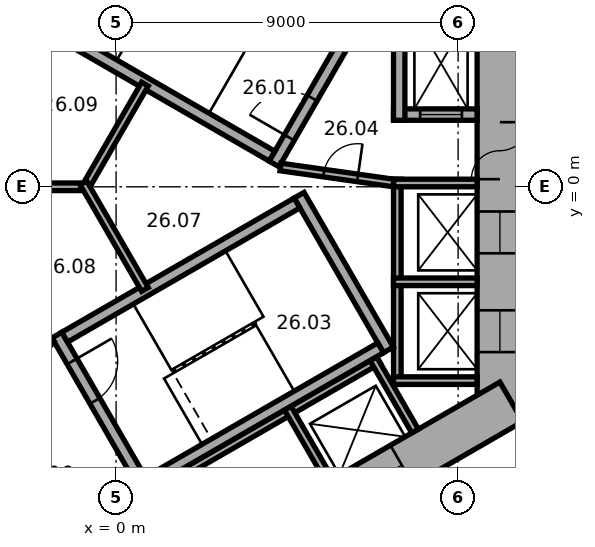
"""IFC4 building model, lengths in metres.
Left out: names, types, materials, properties, quantities, classifications, styles, units other than length and angle.
Written with IfcOpenShell. Run it as: python <this file> out.ifc"""

import sys

from ifc_helpers import new_model, si_unit, direction, frame, frame_2d, origin, place, context, subcontext, project, spatial, rectangle, extrude, element, fill, save


model = new_model("IFC4")
c1 = context("Model", 3, precision=1e-05, world=origin(), true_north=direction((0.0, 1.0)))
c2 = subcontext(c1, "Body", "Model", "MODEL_VIEW")
j1 = project(units=[si_unit("LENGTHUNIT", "METRE"), si_unit("PLANEANGLEUNIT", "RADIAN")], contexts=[c1])
p1 = place(None, origin())
s1 = spatial("IfcSite", under=j1, at=p1, CompositionType="ELEMENT")
p2 = place(p1, origin())
s2 = spatial("IfcBuilding", under=s1, at=p2, CompositionType="ELEMENT")
p3 = place(p2, frame((0.0, 0.0, 110.0)))
s3 = spatial("IfcBuildingStorey", under=s2, at=p3, CompositionType="ELEMENT", Elevation=110.0)
p4 = place(p3, frame((10.1, -6.177, 0.0), z_axis=(0.0, 0.0, 1.0), x_axis=(0.0, 1.0, 0.0)))
e1 = element("IfcWall", 1, at=p4, inside=s3, PredefinedType="SHEAR", context=c2, shape_type="SweptSolid", body=[
    extrude(rectangle(XDim=12.355, YDim=1.2, at=frame_2d((6.177, 0.0))), origin(), (0.0, 0.0, 1.0), 3.3),
])
p5 = place(p4, frame((6.378, 0.0, 0.0)))
e2 = element("IfcOpeningElement", 2, at=p5, cuts=e1, PredefinedType="OPENING", context=c2, shape_type="SweptSolid", body=[
    extrude(rectangle(XDim=1.5, YDim=2.1, at=frame_2d((0.75, 1.05))), frame((0.0, 0.61, 0.0), z_axis=(0.0, -1.0, 0.0), x_axis=(1.0, 0.0, 0.0)), (0.0, 0.0, 1.0), 1.22),
])
p6 = place(p4, frame((1.828, 0.0, 0.0)))
e3 = element("IfcOpeningElement", 3, at=p6, cuts=e1, PredefinedType="OPENING", context=c2, shape_type="SweptSolid", body=[
    extrude(rectangle(XDim=1.1, YDim=2.1, at=frame_2d((0.55, 1.05))), frame((0.0, 0.61, 0.0), z_axis=(0.0, -1.0, 0.0), x_axis=(1.0, 0.0, 0.0)), (0.0, 0.0, 1.0), 1.22),
])
p7 = place(p4, frame((4.427, 0.0, 0.0)))
e4 = element("IfcOpeningElement", 4, at=p7, cuts=e1, PredefinedType="OPENING", context=c2, shape_type="SweptSolid", body=[
    extrude(rectangle(XDim=1.1, YDim=2.1, at=frame_2d((0.55, 1.05))), frame((0.0, 0.61, 0.0), z_axis=(0.0, -1.0, 0.0), x_axis=(1.0, 0.0, 0.0)), (0.0, 0.0, 1.0), 1.22),
])
p8 = place(p3, frame((-10.4, -5.658, 0.0), z_axis=(0.0, 0.0, 1.0), x_axis=(0.866021384402, -0.500006961711, 0.0)))
e5 = element("IfcWall", 5, at=p8, inside=s3, PredefinedType="SHEAR", context=c2, shape_type="SweptSolid", body=[
    extrude(rectangle(XDim=12.355, YDim=1.2, at=frame_2d((6.178, 0.0))), origin(), (0.0, 0.0, 1.0), 3.3),
])
p9 = place(p8, frame((6.378, 0.0, 0.0)))
e6 = element("IfcOpeningElement", 6, at=p9, cuts=e5, PredefinedType="OPENING", context=c2, shape_type="SweptSolid", body=[
    extrude(rectangle(XDim=1.5, YDim=2.1, at=frame_2d((0.75, 1.05))), frame((0.0, 0.61, 0.0), z_axis=(0.0, -1.0, 0.0), x_axis=(1.0, 0.0, 0.0)), (0.0, 0.0, 1.0), 1.22),
])
p10 = place(p8, frame((1.928, 0.0, 0.0)))
e7 = element("IfcOpeningElement", 7, at=p10, cuts=e5, PredefinedType="OPENING", context=c2, shape_type="SweptSolid", body=[
    extrude(rectangle(XDim=0.9, YDim=2.1, at=frame_2d((0.45, 1.05))), frame((0.0, 0.61, 0.0), z_axis=(0.0, -1.0, 0.0), x_axis=(1.0, 0.0, 0.0)), (0.0, 0.0, 1.0), 1.22),
])
p11 = place(p8, frame((4.528, 0.0, 0.0)))
e8 = element("IfcOpeningElement", 8, at=p11, cuts=e5, PredefinedType="OPENING", context=c2, shape_type="SweptSolid", body=[
    extrude(rectangle(XDim=0.9, YDim=2.1, at=frame_2d((0.45, 1.05))), frame((0.0, 0.61, 0.0), z_axis=(0.0, -1.0, 0.0), x_axis=(1.0, 0.0, 0.0)), (0.0, 0.0, 1.0), 1.22),
])
p12 = place(p3, frame((-0.3, -11.836, 0.0), z_axis=(0.0, 0.0, 1.0), x_axis=(0.866021384402, 0.500006961711, 0.0)))
e9 = element("IfcWall", 9, at=p12, inside=s3, PredefinedType="SHEAR", context=c2, shape_type="SweptSolid", body=[
    extrude(rectangle(XDim=12.355, YDim=1.2, at=frame_2d((6.178, 0.0))), origin(), (0.0, 0.0, 1.0), 3.3),
])
p13 = place(p12, frame((4.128, 0.0, 0.0)))
e10 = element("IfcOpeningElement", 10, at=p13, cuts=e9, PredefinedType="OPENING", context=c2, shape_type="SweptSolid", body=[
    extrude(rectangle(XDim=0.9, YDim=2.1, at=frame_2d((0.45, 1.05))), frame((0.0, 0.61, 0.0), z_axis=(0.0, -1.0, 0.0), x_axis=(1.0, 0.0, 0.0)), (0.0, 0.0, 1.0), 1.22),
])
p14 = place(p12, frame((7.928, 0.0, 0.0)))
e11 = element("IfcOpeningElement", 11, at=p14, cuts=e9, PredefinedType="OPENING", context=c2, shape_type="SweptSolid", body=[
    extrude(rectangle(XDim=1.1, YDim=2.1, at=frame_2d((0.55, 1.05))), frame((0.0, 0.61, 0.0), z_axis=(0.0, -1.0, 0.0), x_axis=(1.0, 0.0, 0.0)), (0.0, 0.0, 1.0), 1.22),
])
p15 = place(p3, frame((7.4, -5.2, 0.0), z_axis=(0.0, 0.0, 1.0), x_axis=(0.0, 1.0, 0.0)))
e12 = element("IfcWall", 12, at=p15, inside=s3, PredefinedType="PARTITIONING", context=c2, shape_type="SweptSolid", body=[
    extrude(rectangle(XDim=5.4, YDim=0.2, at=frame_2d((2.7, 0.0))), origin(), (0.0, 0.0, 1.0), 3.05),
])
for number, where, z_axis, x_axis in (
    (13, (7.3, -5.1, 0.0), (0.0, 0.0, 1.0), (1.0, 0.0, 0.0)),
    (14, (7.3, -2.5, 0.0), (0.0, 0.0, 1.0), (1.0, 0.0, 0.0)),
    (15, (7.3, 0.1, 0.0), (0.0, 0.0, 1.0), (1.0, 0.0, 0.0)),
):
    element("IfcWall", number, at=place(p3, frame(where, z_axis=z_axis, x_axis=x_axis)), inside=s3, PredefinedType="PARTITIONING", context=c2, shape_type="SweptSolid", body=[
        extrude(rectangle(XDim=2.2, YDim=0.2, at=frame_2d((1.1, 0.0))), origin(), (0.0, 0.0, 1.0), 3.05),
    ])
p16 = place(p3, frame((-0.024, -8.559, 0.0), z_axis=(0.0, 0.0, 1.0), x_axis=(0.866026010844, 0.49999894854, 0.0)))
e16 = element("IfcWall", 16, at=p16, inside=s3, PredefinedType="PARTITIONING", context=c2, shape_type="SweptSolid", body=[
    extrude(rectangle(XDim=8.0, YDim=0.2, at=frame_2d((4.0, 0.0))), origin(), (0.0, 0.0, 1.0), 3.05),
])
for number, where, z_axis, x_axis in (
    (17, (4.516, -5.822, 0.0), (0.0, 0.0, 1.0), (0.5, -0.866, 0.0)),
    (18, (6.768, -4.522, 0.0), (0.0, 0.0, 1.0), (0.5, -0.866, 0.0)),
):
    element("IfcWall", number, at=place(p3, frame(where, z_axis=z_axis, x_axis=x_axis)), inside=s3, PredefinedType="PARTITIONING", context=c2, shape_type="SweptSolid", body=[
        extrude(rectangle(XDim=2.2, YDim=0.2, at=frame_2d((1.1, 0.0))), origin(), (0.0, 0.0, 1.0), 3.05),
    ])
p17 = place(p3, frame((4.158, 0.602, 0.0), z_axis=(0.0, 0.0, 1.0), x_axis=(0.499977259774, 0.866038532462, 0.0)))
e19 = element("IfcWall", 19, at=p17, inside=s3, PredefinedType="SHEAR", context=c2, shape_type="SweptSolid", body=[
    extrude(rectangle(XDim=4.7, YDim=0.3, at=frame_2d((2.35, 0.0))), origin(), (0.0, 0.0, 1.0), 3.05),
])
p18 = place(p17, frame((0.8, 0.0, 0.0)))
e20 = element("IfcOpeningElement", 20, at=p18, cuts=e19, PredefinedType="OPENING", context=c2, shape_type="SweptSolid", body=[
    extrude(rectangle(XDim=1.2, YDim=2.1, at=frame_2d((0.6, 1.05))), frame((0.0, 0.16, 0.0), z_axis=(0.0, -1.0, 0.0), x_axis=(1.0, 0.0, 0.0)), (0.0, 0.0, 1.0), 0.32),
])
p19 = place(p3, frame((4.103, 0.807, 0.0), z_axis=(0.0, 0.0, 1.0), x_axis=(-0.866027801685, 0.499995846692, 0.0)))
e21 = element("IfcWall", 21, at=p19, inside=s3, PredefinedType="SHEAR", context=c2, shape_type="SweptSolid", body=[
    extrude(rectangle(XDim=7.06, YDim=0.3, at=frame_2d((3.53, 0.0))), origin(), (0.0, 0.0, 1.0), 3.05),
])
p20 = place(p3, frame((-1.558, -3.902, 0.0), z_axis=(0.0, 0.0, 1.0), x_axis=(0.499977259774, -0.866038532462, 0.0)))
e22 = element("IfcWall", 22, at=p20, inside=s3, PredefinedType="SHEAR", context=c2, shape_type="SweptSolid", body=[
    extrude(rectangle(XDim=4.7, YDim=0.3, at=frame_2d((2.35, 0.0))), origin(), (0.0, 0.0, 1.0), 3.05),
])
p21 = place(p20, frame((0.8, 0.0, 0.0)))
e23 = element("IfcOpeningElement", 23, at=p21, cuts=e22, PredefinedType="OPENING", context=c2, shape_type="SweptSolid", body=[
    extrude(rectangle(XDim=1.2, YDim=2.1, at=frame_2d((0.6, 1.05))), frame((0.0, 0.16, 0.0), z_axis=(0.0, -1.0, 0.0), x_axis=(1.0, 0.0, 0.0)), (0.0, 0.0, 1.0), 0.32),
])
p22 = place(p3, frame((4.816, -0.222, 0.0), z_axis=(0.0, 0.0, 1.0), x_axis=(0.499977259774, -0.866038532462, 0.0)))
e24 = element("IfcWall", 24, at=p22, inside=s3, PredefinedType="SHEAR", context=c2, shape_type="SweptSolid", body=[
    extrude(rectangle(XDim=4.7, YDim=0.3, at=frame_2d((2.35, 0.0))), origin(), (0.0, 0.0, 1.0), 3.05),
])
for number, where, z_axis, x_axis in (
    (25, (-1.353, -3.957, 0.0), (0.0, 0.0, 1.0), (0.866, 0.5, 0.0)),
    (26, (0.847, -7.767, 0.0), (0.0, 0.0, 1.0), (0.866, 0.5, 0.0)),
):
    element("IfcWall", number, at=place(p3, frame(where, z_axis=z_axis, x_axis=x_axis)), inside=s3, PredefinedType="SHEAR", context=c2, shape_type="SweptSolid", body=[
        extrude(rectangle(XDim=7.06, YDim=0.3, at=frame_2d((3.53, 0.0))), origin(), (0.0, 0.0, 1.0), 3.05),
    ])
p23 = place(p3, frame((7.3, 1.9, 0.0), z_axis=(0.0, 0.0, 1.0), x_axis=(1.0, 0.0, 0.0)))
e27 = element("IfcWall", 27, at=p23, inside=s3, PredefinedType="SHEAR", context=c2, shape_type="SweptSolid", body=[
    extrude(rectangle(XDim=2.2, YDim=0.3, at=frame_2d((1.1, 0.0))), origin(), (0.0, 0.0, 1.0), 3.05),
])
p24 = place(p23, frame((0.7, 0.0, 0.0)))
e28 = element("IfcOpeningElement", 28, at=p24, cuts=e27, PredefinedType="OPENING", context=c2, shape_type="SweptSolid", body=[
    extrude(rectangle(XDim=1.1, YDim=2.1, at=frame_2d((0.55, 1.05))), frame((0.0, 0.16, 0.0), z_axis=(0.0, -1.0, 0.0), x_axis=(1.0, 0.0, 0.0)), (0.0, 0.0, 1.0), 0.32),
])
p25 = place(p3, frame((7.45, 1.75, 0.0), z_axis=(0.0, 0.0, 1.0), x_axis=(0.0, 1.0, 0.0)))
e29 = element("IfcWall", 29, at=p25, inside=s3, PredefinedType="SHEAR", context=c2, shape_type="SweptSolid", body=[
    extrude(rectangle(XDim=3.35, YDim=0.3, at=frame_2d((1.675, 0.0))), origin(), (0.0, 0.0, 1.0), 3.05),
])
p26 = place(p3, frame((4.327, 0.521, 0.0), z_axis=(0.0, 0.0, 1.0), x_axis=(0.990124376366, -0.14019172346, 0.0)))
e30 = element("IfcWall", 30, at=p26, inside=s3, PredefinedType="PARTITIONING", context=c2, shape_type="SweptSolid", body=[
    extrude(rectangle(XDim=3.002, YDim=0.2, at=frame_2d((1.501, 0.0))), origin(), (0.0, 0.0, 1.0), 3.05),
])
p27 = place(p26, frame((1.15, 0.0, 0.0)))
e31 = element("IfcOpeningElement", 31, at=p27, cuts=e30, PredefinedType="OPENING", context=c2, shape_type="SweptSolid", body=[
    extrude(rectangle(XDim=0.9, YDim=2.1, at=frame_2d((0.45, 1.05))), frame((0.0, 0.11, 0.0), z_axis=(0.0, -1.0, 0.0), x_axis=(1.0, 0.0, 0.0)), (0.0, 0.0, 1.0), 0.22),
])
p28 = place(p3, frame((-1.712, -4.008, 0.0), z_axis=(0.0, 0.0, 1.0), x_axis=(-0.616549420702, -0.787316208287, 0.0)))
e32 = element("IfcWall", 32, at=p28, inside=s3, PredefinedType="PARTITIONING", context=c2, shape_type="SweptSolid", body=[
    extrude(rectangle(XDim=3.002, YDim=0.2, at=frame_2d((1.501, 0.0))), origin(), (0.0, 0.0, 1.0), 3.05),
])
p29 = place(p28, frame((1.15, 0.0, 0.0)))
e33 = element("IfcOpeningElement", 33, at=p29, cuts=e32, PredefinedType="OPENING", context=c2, shape_type="SweptSolid", body=[
    extrude(rectangle(XDim=0.9, YDim=2.1, at=frame_2d((0.45, 1.05))), frame((0.0, 0.11, 0.0), z_axis=(0.0, -1.0, 0.0), x_axis=(1.0, 0.0, 0.0)), (0.0, 0.0, 1.0), 0.22),
])
p30 = place(p3, frame((-0.68, 0.0, 0.0), z_axis=(0.0, 0.0, 1.0), x_axis=(-1.0, 0.0, 0.0)))
e34 = element("IfcWall", 34, at=p30, inside=s3, PredefinedType="PARTITIONING", context=c2, shape_type="SweptSolid", body=[
    extrude(rectangle(XDim=2.04, YDim=0.2, at=frame_2d((1.02, 0.0))), origin(), (0.0, 0.0, 1.0), 3.05),
])
for number, where, z_axis, x_axis in (
    (35, (-0.86, -0.104, 0.0), (0.0, 0.0, 1.0), (0.5, 0.866, 0.0)),
    (36, (-0.86, 0.104, 0.0), (0.0, 0.0, 1.0), (0.5, -0.866, 0.0)),
):
    element("IfcWall", number, at=place(p3, frame(where, z_axis=z_axis, x_axis=x_axis)), inside=s3, PredefinedType="PARTITIONING", context=c2, shape_type="SweptSolid", body=[
        extrude(rectangle(XDim=3.24, YDim=0.2, at=frame_2d((1.62, 0.0))), origin(), (0.0, 0.0, 1.0), 3.05),
    ])
p31 = place(p5, origin())
e37 = element("IfcDoor", 37, at=p31, inside=s3, OperationType="DOUBLE_DOOR_SINGLE_SWING", PredefinedType="DOOR", context=c2, shape_type="SweptSolid", body=[
    extrude(rectangle(XDim=1.5, YDim=2.1, at=frame_2d((0.75, 1.05))), frame((0.0, 0.025, 0.0), z_axis=(0.0, -1.0, 0.0), x_axis=(1.0, 0.0, 0.0)), (0.0, 0.0, 1.0), 0.05),
])
fill(e2, e37)
p32 = place(p18, origin())
e38 = element("IfcDoor", 38, at=p32, inside=s3, OperationType="SINGLE_SWING_RIGHT", PredefinedType="DOOR", context=c2, shape_type="SweptSolid", body=[
    extrude(rectangle(XDim=1.2, YDim=2.1, at=frame_2d((0.6, 1.05))), frame((0.0, 0.025, 0.0), z_axis=(0.0, -1.0, 0.0), x_axis=(1.0, 0.0, 0.0)), (0.0, 0.0, 1.0), 0.05),
])
fill(e20, e38)
p33 = place(p21, origin())
e39 = element("IfcDoor", 39, at=p33, inside=s3, OperationType="SINGLE_SWING_RIGHT", PredefinedType="DOOR", context=c2, shape_type="SweptSolid", body=[
    extrude(rectangle(XDim=1.2, YDim=2.1, at=frame_2d((0.6, 1.05))), frame((0.0, 0.025, 0.0), z_axis=(0.0, -1.0, 0.0), x_axis=(1.0, 0.0, 0.0)), (0.0, 0.0, 1.0), 0.05),
])
fill(e23, e39)
p34 = place(p27, origin())
e40 = element("IfcDoor", 40, at=p34, inside=s3, OperationType="SINGLE_SWING_LEFT", PredefinedType="DOOR", context=c2, shape_type="SweptSolid", body=[
    extrude(rectangle(XDim=0.9, YDim=2.1, at=frame_2d((0.45, 1.05))), frame((0.0, 0.025, 0.0), z_axis=(0.0, -1.0, 0.0), x_axis=(1.0, 0.0, 0.0)), (0.0, 0.0, 1.0), 0.05),
])
fill(e31, e40)
p35 = place(p24, origin())
e41 = element("IfcDoor", 41, at=p35, inside=s3, OperationType="DOUBLE_DOOR_SLIDING", PredefinedType="DOOR", context=c2, shape_type="SweptSolid", body=[
    extrude(rectangle(XDim=1.1, YDim=2.1, at=frame_2d((0.55, 1.05))), frame((0.0, 0.025, 0.0), z_axis=(0.0, -1.0, 0.0), x_axis=(1.0, 0.0, 0.0)), (0.0, 0.0, 1.0), 0.05),
])
fill(e28, e41)
p36 = place(p6, origin())
e42 = element("IfcDoor", 42, at=p36, inside=s3, OperationType="DOUBLE_DOOR_SLIDING", PredefinedType="DOOR", context=c2, shape_type="SweptSolid", body=[
    extrude(rectangle(XDim=1.1, YDim=2.1, at=frame_2d((0.55, 1.05))), frame((0.0, 0.025, 0.0), z_axis=(0.0, -1.0, 0.0), x_axis=(1.0, 0.0, 0.0)), (0.0, 0.0, 1.0), 0.05),
])
fill(e3, e42)
p37 = place(p7, origin())
e43 = element("IfcDoor", 43, at=p37, inside=s3, OperationType="DOUBLE_DOOR_SLIDING", PredefinedType="DOOR", context=c2, shape_type="SweptSolid", body=[
    extrude(rectangle(XDim=1.1, YDim=2.1, at=frame_2d((0.55, 1.05))), frame((0.0, 0.025, 0.0), z_axis=(0.0, -1.0, 0.0), x_axis=(1.0, 0.0, 0.0)), (0.0, 0.0, 1.0), 0.05),
])
fill(e4, e43)
p38 = place(p14, origin())
e44 = element("IfcDoor", 44, at=p38, inside=s3, OperationType="DOUBLE_DOOR_SLIDING", PredefinedType="DOOR", context=c2, shape_type="SweptSolid", body=[
    extrude(rectangle(XDim=1.1, YDim=2.1, at=frame_2d((0.55, 1.05))), frame((0.0, 0.025, 0.0), z_axis=(0.0, -1.0, 0.0), x_axis=(1.0, 0.0, 0.0)), (0.0, 0.0, 1.0), 0.05),
])
fill(e11, e44)
save(model, sys.argv[1])
